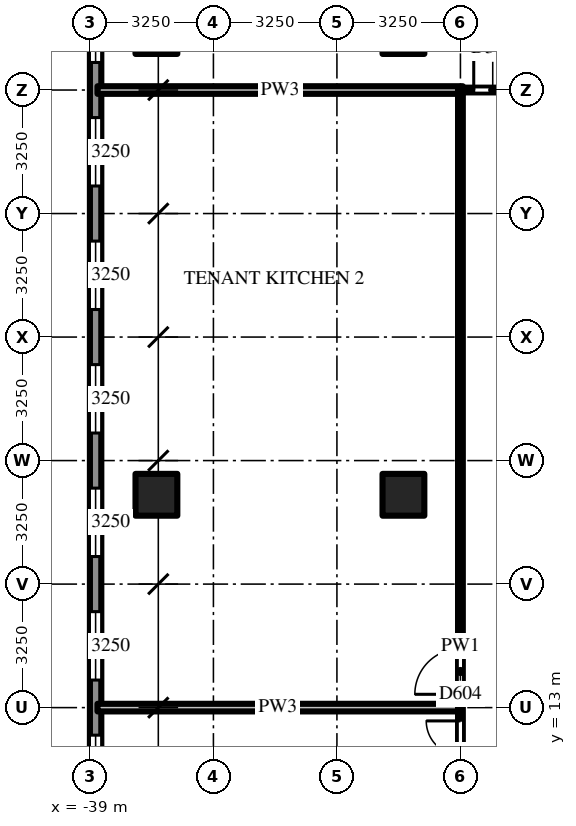
"""IFC4 building model, lengths in metres.
Left out: names, types, materials, properties, quantities, classifications, styles, units other than length and angle.
Written with IfcOpenShell. Run it as: python <this file> out.ifc"""

import sys

from ifc_helpers import new_model, si_unit, direction, frame, frame_2d, origin, origin_2d, place, context, subcontext, project, spatial, rectangle, extrude, source, transform, mapped, element, fill, save


model = new_model("IFC4")
c1 = context("Model", 3, precision=1e-05, world=origin(), true_north=direction((0.0, 1.0)))
c2 = subcontext(c1, "Body", "Model", "MODEL_VIEW")
j1 = project(units=[si_unit("LENGTHUNIT", "METRE"), si_unit("PLANEANGLEUNIT", "RADIAN")], contexts=[c1])
p1 = place(None, origin())
s1 = spatial("IfcSite", under=j1, at=p1, CompositionType="ELEMENT")
p2 = place(p1, origin())
s2 = spatial("IfcBuilding", under=s1, at=p2, CompositionType="ELEMENT")
p3 = place(p2, frame((0.0, 0.0, 19.0)))
s3 = spatial("IfcBuildingStorey", under=s2, at=p3, CompositionType="ELEMENT", Elevation=19.0)
m1 = source(origin(), c2, "Body", "SweptSolid", [
    extrude(rectangle(XDim=1.1, YDim=1.1, at=origin_2d()), origin(), (0.0, 0.0, 1.0), 5.0),
])
for number, where, z_axis, x_axis in (
    (1, (-30.75, 18.6, 0.0), (0.0, 0.0, 1.0), (1.0, 0.0, 0.0)),
    (2, (-30.75, 30.75, 0.0), (0.0, 0.0, 1.0), (1.0, 0.0, 0.0)),
    (3, (-37.25, 18.6, 0.0), (0.0, 0.0, 1.0), (1.0, 0.0, 0.0)),
    (4, (-37.25, 30.75, 0.0), (0.0, 0.0, 1.0), (1.0, 0.0, 0.0)),
):
    element("IfcColumn", number, at=place(p3, frame(where, z_axis=z_axis, x_axis=x_axis)), inside=s3, PredefinedType="COLUMN", context=c2, shape_type="MappedRepresentation", body=[
        mapped(m1, transform((0.0, 0.0, 0.0))),
    ])
m2 = source(origin(), c2, "Body", "SweptSolid", [
    extrude(rectangle(XDim=71.5, YDim=0.3, at=frame_2d((35.75, 0.0))), origin(), (0.0, 0.0, 1.0), 4.7),
])
p4 = place(p3, frame((-38.85, 35.75, 0.0), z_axis=(0.0, 0.0, 1.0), x_axis=(0.0, -1.0, 0.0)))
e5 = element("IfcWall", 5, at=p4, inside=s3, PredefinedType="SOLIDWALL", context=c2, shape_type="MappedRepresentation", body=[
    mapped(m2, transform((0.0, 0.0, 0.0))),
])
m3 = source(origin(), c2, "Body", "SweptSolid", [
    extrude(rectangle(XDim=1.8, YDim=3.0, at=frame_2d((0.9, 1.5))), frame((0.0, 0.16, 0.0), z_axis=(0.0, -1.0, 0.0), x_axis=(1.0, 0.0, 0.0)), (0.0, 0.0, 1.0), 0.32),
])
p5 = place(p4, frame((0.725, 0.0, 0.9)))
e6 = element("IfcOpeningElement", 6, at=p5, cuts=e5, PredefinedType="OPENING", context=c2, shape_type="MappedRepresentation", body=[
    mapped(m3, transform((0.0, 0.0, 0.0))),
])
p6 = place(p4, frame((3.975, 0.0, 0.9)))
e7 = element("IfcOpeningElement", 7, at=p6, cuts=e5, PredefinedType="OPENING", context=c2, shape_type="MappedRepresentation", body=[
    mapped(m3, transform((0.0, 0.0, 0.0))),
])
p7 = place(p4, frame((7.225, 0.0, 0.9)))
e8 = element("IfcOpeningElement", 8, at=p7, cuts=e5, PredefinedType="OPENING", context=c2, shape_type="MappedRepresentation", body=[
    mapped(m3, transform((0.0, 0.0, 0.0))),
])
p8 = place(p4, frame((10.475, 0.0, 0.9)))
e9 = element("IfcOpeningElement", 9, at=p8, cuts=e5, PredefinedType="OPENING", context=c2, shape_type="MappedRepresentation", body=[
    mapped(m3, transform((0.0, 0.0, 0.0))),
])
p9 = place(p4, frame((13.725, 0.0, 0.9)))
e10 = element("IfcOpeningElement", 10, at=p9, cuts=e5, PredefinedType="OPENING", context=c2, shape_type="MappedRepresentation", body=[
    mapped(m3, transform((0.0, 0.0, 0.0))),
])
p10 = place(p4, frame((16.975, 0.0, 0.9)))
e11 = element("IfcOpeningElement", 11, at=p10, cuts=e5, PredefinedType="OPENING", context=c2, shape_type="MappedRepresentation", body=[
    mapped(m3, transform((0.0, 0.0, 0.0))),
])
p11 = place(p4, frame((20.225, 0.0, 0.9)))
e12 = element("IfcOpeningElement", 12, at=p11, cuts=e5, PredefinedType="OPENING", context=c2, shape_type="MappedRepresentation", body=[
    mapped(m3, transform((0.0, 0.0, 0.0))),
])
p12 = place(p4, frame((23.475, 0.0, 0.9)))
e13 = element("IfcOpeningElement", 13, at=p12, cuts=e5, PredefinedType="OPENING", context=c2, shape_type="MappedRepresentation", body=[
    mapped(m3, transform((0.0, 0.0, 0.0))),
])
p13 = place(p4, frame((26.725, 0.0, 0.9)))
e14 = element("IfcOpeningElement", 14, at=p13, cuts=e5, PredefinedType="OPENING", context=c2, shape_type="MappedRepresentation", body=[
    mapped(m3, transform((0.0, 0.0, 0.0))),
])
p14 = place(p4, frame((29.975, 0.0, 0.9)))
e15 = element("IfcOpeningElement", 15, at=p14, cuts=e5, PredefinedType="OPENING", context=c2, shape_type="MappedRepresentation", body=[
    mapped(m3, transform((0.0, 0.0, 0.0))),
])
p15 = place(p4, frame((33.225, 0.0, 0.9)))
e16 = element("IfcOpeningElement", 16, at=p15, cuts=e5, PredefinedType="OPENING", context=c2, shape_type="MappedRepresentation", body=[
    mapped(m3, transform((0.0, 0.0, 0.0))),
])
p16 = place(p4, frame((36.475, 0.0, 0.9)))
e17 = element("IfcOpeningElement", 17, at=p16, cuts=e5, PredefinedType="OPENING", context=c2, shape_type="MappedRepresentation", body=[
    mapped(m3, transform((0.0, 0.0, 0.0))),
])
p17 = place(p4, frame((39.725, 0.0, 0.9)))
e18 = element("IfcOpeningElement", 18, at=p17, cuts=e5, PredefinedType="OPENING", context=c2, shape_type="MappedRepresentation", body=[
    mapped(m3, transform((0.0, 0.0, 0.0))),
])
p18 = place(p4, frame((42.975, 0.0, 0.9)))
e19 = element("IfcOpeningElement", 19, at=p18, cuts=e5, PredefinedType="OPENING", context=c2, shape_type="MappedRepresentation", body=[
    mapped(m3, transform((0.0, 0.0, 0.0))),
])
p19 = place(p4, frame((46.225, 0.0, 0.9)))
e20 = element("IfcOpeningElement", 20, at=p19, cuts=e5, PredefinedType="OPENING", context=c2, shape_type="MappedRepresentation", body=[
    mapped(m3, transform((0.0, 0.0, 0.0))),
])
p20 = place(p4, frame((49.475, 0.0, 0.9)))
e21 = element("IfcOpeningElement", 21, at=p20, cuts=e5, PredefinedType="OPENING", context=c2, shape_type="MappedRepresentation", body=[
    mapped(m3, transform((0.0, 0.0, 0.0))),
])
p21 = place(p4, frame((52.725, 0.0, 0.9)))
e22 = element("IfcOpeningElement", 22, at=p21, cuts=e5, PredefinedType="OPENING", context=c2, shape_type="MappedRepresentation", body=[
    mapped(m3, transform((0.0, 0.0, 0.0))),
])
p22 = place(p4, frame((55.975, 0.0, 0.9)))
e23 = element("IfcOpeningElement", 23, at=p22, cuts=e5, PredefinedType="OPENING", context=c2, shape_type="MappedRepresentation", body=[
    mapped(m3, transform((0.0, 0.0, 0.0))),
])
p23 = place(p4, frame((59.225, 0.0, 0.9)))
e24 = element("IfcOpeningElement", 24, at=p23, cuts=e5, PredefinedType="OPENING", context=c2, shape_type="MappedRepresentation", body=[
    mapped(m3, transform((0.0, 0.0, 0.0))),
])
p24 = place(p4, frame((62.475, 0.0, 0.9)))
e25 = element("IfcOpeningElement", 25, at=p24, cuts=e5, PredefinedType="OPENING", context=c2, shape_type="MappedRepresentation", body=[
    mapped(m3, transform((0.0, 0.0, 0.0))),
])
p25 = place(p4, frame((65.725, 0.0, 0.9)))
e26 = element("IfcOpeningElement", 26, at=p25, cuts=e5, PredefinedType="OPENING", context=c2, shape_type="MappedRepresentation", body=[
    mapped(m3, transform((0.0, 0.0, 0.0))),
])
p26 = place(p4, frame((68.975, 0.0, 0.9)))
e27 = element("IfcOpeningElement", 27, at=p26, cuts=e5, PredefinedType="OPENING", context=c2, shape_type="MappedRepresentation", body=[
    mapped(m3, transform((0.0, 0.0, 0.0))),
])
p27 = place(p3, frame((-29.25, 0.1, 0.0), z_axis=(0.0, 0.0, 1.0), x_axis=(0.0, 1.0, 0.0)))
e28 = element("IfcWall", 28, at=p27, inside=s3, PredefinedType="PARTITIONING", context=c2, shape_type="SweptSolid", body=[
    extrude(rectangle(XDim=29.05, YDim=0.125, at=frame_2d((14.525, 0.0))), origin(), (0.0, 0.0, 1.0), 3.762),
])
m4 = source(origin(), c2, "Body", "SweptSolid", [
    extrude(rectangle(XDim=1.8, YDim=2.1, at=frame_2d((0.9, 1.05))), frame((0.0, 0.073, 0.0), z_axis=(0.0, -1.0, 0.0), x_axis=(1.0, 0.0, 0.0)), (0.0, 0.0, 1.0), 0.145),
])
p28 = place(p27, frame((10.75, 0.0, 0.0)))
e29 = element("IfcOpeningElement", 29, at=p28, cuts=e28, PredefinedType="OPENING", context=c2, shape_type="MappedRepresentation", body=[
    mapped(m4, transform((0.0, 0.0, 0.0))),
])
m5 = source(origin(), c2, "Body", "SweptSolid", [
    extrude(rectangle(XDim=1.2, YDim=2.1, at=frame_2d((0.6, 1.05))), frame((0.0, 0.073, 0.0), z_axis=(0.0, -1.0, 0.0), x_axis=(1.0, 0.0, 0.0)), (0.0, 0.0, 1.0), 0.145),
])
p29 = place(p27, frame((13.25, 0.0, 0.0)))
e30 = element("IfcOpeningElement", 30, at=p29, cuts=e28, PredefinedType="OPENING", context=c2, shape_type="MappedRepresentation", body=[
    mapped(m5, transform((0.0, 0.0, 0.0))),
])
p30 = place(p3, frame((-38.8, 13.0, 0.0), z_axis=(0.0, 0.0, 1.0), x_axis=(1.0, 0.0, 0.0)))
e31 = element("IfcWall", 31, at=p30, inside=s3, PredefinedType="PARTITIONING", context=c2, shape_type="SweptSolid", body=[
    extrude(rectangle(XDim=9.488, YDim=0.2, at=frame_2d((4.744, 0.0))), origin(), (0.0, 0.0, 1.0), 3.762),
])
m6 = source(origin(), c2, "Body", "SweptSolid", [
    extrude(rectangle(XDim=9.613, YDim=0.2, at=frame_2d((4.806, 0.0))), origin(), (0.0, 0.0, 1.0), 3.762),
])
p31 = place(p3, frame((-38.8, 29.25, 0.0), z_axis=(0.0, 0.0, 1.0), x_axis=(1.0, 0.0, 0.0)))
e32 = element("IfcWall", 32, at=p31, inside=s3, PredefinedType="PARTITIONING", context=c2, shape_type="MappedRepresentation", body=[
    mapped(m6, transform((0.0, 0.0, 0.0))),
])
m7 = source(origin(), c2, "Body", "SweptSolid", [
    extrude(rectangle(XDim=3.413, YDim=0.125, at=frame_2d((1.706, 0.0))), origin(), (0.0, 0.0, 1.0), 4.7),
])
p32 = place(p3, frame((-29.312, 29.25, 0.0), z_axis=(0.0, 0.0, 1.0), x_axis=(1.0, 0.0, 0.0)))
e33 = element("IfcWall", 33, at=p32, inside=s3, PredefinedType="PARTITIONING", context=c2, shape_type="MappedRepresentation", body=[
    mapped(m7, transform((0.0, 0.0, 0.0))),
])
m8 = source(origin(), c2, "Body", "SweptSolid", [
    extrude(rectangle(XDim=1.0, YDim=2.1, at=frame_2d((0.5, 1.05))), frame((0.0, 0.073, 0.0), z_axis=(0.0, -1.0, 0.0), x_axis=(1.0, 0.0, 0.0)), (0.0, 0.0, 1.0), 0.145),
])
p33 = place(p32, frame((0.413, 0.0, 0.0)))
e34 = element("IfcOpeningElement", 34, at=p33, cuts=e33, PredefinedType="OPENING", context=c2, shape_type="MappedRepresentation", body=[
    mapped(m8, transform((0.0, 0.0, 0.0))),
])
m9 = source(origin(), c2, "Body", "SweptSolid", [
    extrude(rectangle(XDim=1.8, YDim=3.0, at=frame_2d((0.9, 1.5))), frame((0.0, 0.03, 0.0), z_axis=(0.0, -1.0, 0.0), x_axis=(1.0, 0.0, 0.0)), (0.0, 0.0, 1.0), 0.06),
])
p34 = place(p6, origin())
e35 = element("IfcWindow", 35, at=p34, inside=s3, PartitioningType="SINGLE_PANEL", PredefinedType="WINDOW", context=c2, shape_type="MappedRepresentation", body=[
    mapped(m9, transform((0.0, 0.0, 0.0))),
])
fill(e7, e35)
p35 = place(p7, origin())
e36 = element("IfcWindow", 36, at=p35, inside=s3, PartitioningType="SINGLE_PANEL", PredefinedType="WINDOW", context=c2, shape_type="MappedRepresentation", body=[
    mapped(m9, transform((0.0, 0.0, 0.0))),
])
fill(e8, e36)
p36 = place(p8, origin())
e37 = element("IfcWindow", 37, at=p36, inside=s3, PartitioningType="SINGLE_PANEL", PredefinedType="WINDOW", context=c2, shape_type="MappedRepresentation", body=[
    mapped(m9, transform((0.0, 0.0, 0.0))),
])
fill(e9, e37)
p37 = place(p9, origin())
e38 = element("IfcWindow", 38, at=p37, inside=s3, PartitioningType="SINGLE_PANEL", PredefinedType="WINDOW", context=c2, shape_type="MappedRepresentation", body=[
    mapped(m9, transform((0.0, 0.0, 0.0))),
])
fill(e10, e38)
p38 = place(p10, origin())
e39 = element("IfcWindow", 39, at=p38, inside=s3, PartitioningType="SINGLE_PANEL", PredefinedType="WINDOW", context=c2, shape_type="MappedRepresentation", body=[
    mapped(m9, transform((0.0, 0.0, 0.0))),
])
fill(e11, e39)
p39 = place(p11, origin())
e40 = element("IfcWindow", 40, at=p39, inside=s3, PartitioningType="SINGLE_PANEL", PredefinedType="WINDOW", context=c2, shape_type="MappedRepresentation", body=[
    mapped(m9, transform((0.0, 0.0, 0.0))),
])
fill(e12, e40)
p40 = place(p12, origin())
e41 = element("IfcWindow", 41, at=p40, inside=s3, PartitioningType="SINGLE_PANEL", PredefinedType="WINDOW", context=c2, shape_type="MappedRepresentation", body=[
    mapped(m9, transform((0.0, 0.0, 0.0))),
])
fill(e13, e41)
m10 = source(origin(), c2, "Body", "SweptSolid", [
    extrude(rectangle(XDim=1.8, YDim=2.1, at=frame_2d((0.9, 1.05))), frame((0.0, 0.025, 0.0), z_axis=(0.0, -1.0, 0.0), x_axis=(1.0, 0.0, 0.0)), (0.0, 0.0, 1.0), 0.05),
])
p41 = place(p28, origin())
e42 = element("IfcDoor", 42, at=p41, inside=s3, OperationType="DOUBLE_DOOR_SINGLE_SWING", PredefinedType="DOOR", context=c2, shape_type="MappedRepresentation", body=[
    mapped(m10, transform((0.0, 0.0, 0.0))),
])
fill(e29, e42)
m11 = source(origin(), c2, "Body", "SweptSolid", [
    extrude(rectangle(XDim=1.2, YDim=2.1, at=frame_2d((0.6, 1.05))), frame((0.0, 0.025, 0.0), z_axis=(0.0, -1.0, 0.0), x_axis=(1.0, 0.0, 0.0)), (0.0, 0.0, 1.0), 0.05),
])
p42 = place(p29, origin())
e43 = element("IfcDoor", 43, at=p42, inside=s3, OperationType="SINGLE_SWING_LEFT", PredefinedType="DOOR", context=c2, shape_type="MappedRepresentation", body=[
    mapped(m11, transform((0.0, 0.0, 0.0))),
])
fill(e30, e43)
m12 = source(origin(), c2, "Body", "SweptSolid", [
    extrude(rectangle(XDim=1.0, YDim=2.1, at=frame_2d((0.5, 1.05))), frame((0.0, 0.025, 0.0), z_axis=(0.0, -1.0, 0.0), x_axis=(1.0, 0.0, 0.0)), (0.0, 0.0, 1.0), 0.05),
])
p43 = place(p33, origin())
e44 = element("IfcDoor", 44, at=p43, inside=s3, OperationType="SINGLE_SWING_LEFT", PredefinedType="DOOR", context=c2, shape_type="MappedRepresentation", body=[
    mapped(m12, transform((0.0, 0.0, 0.0))),
])
fill(e34, e44)
save(model, sys.argv[1])
